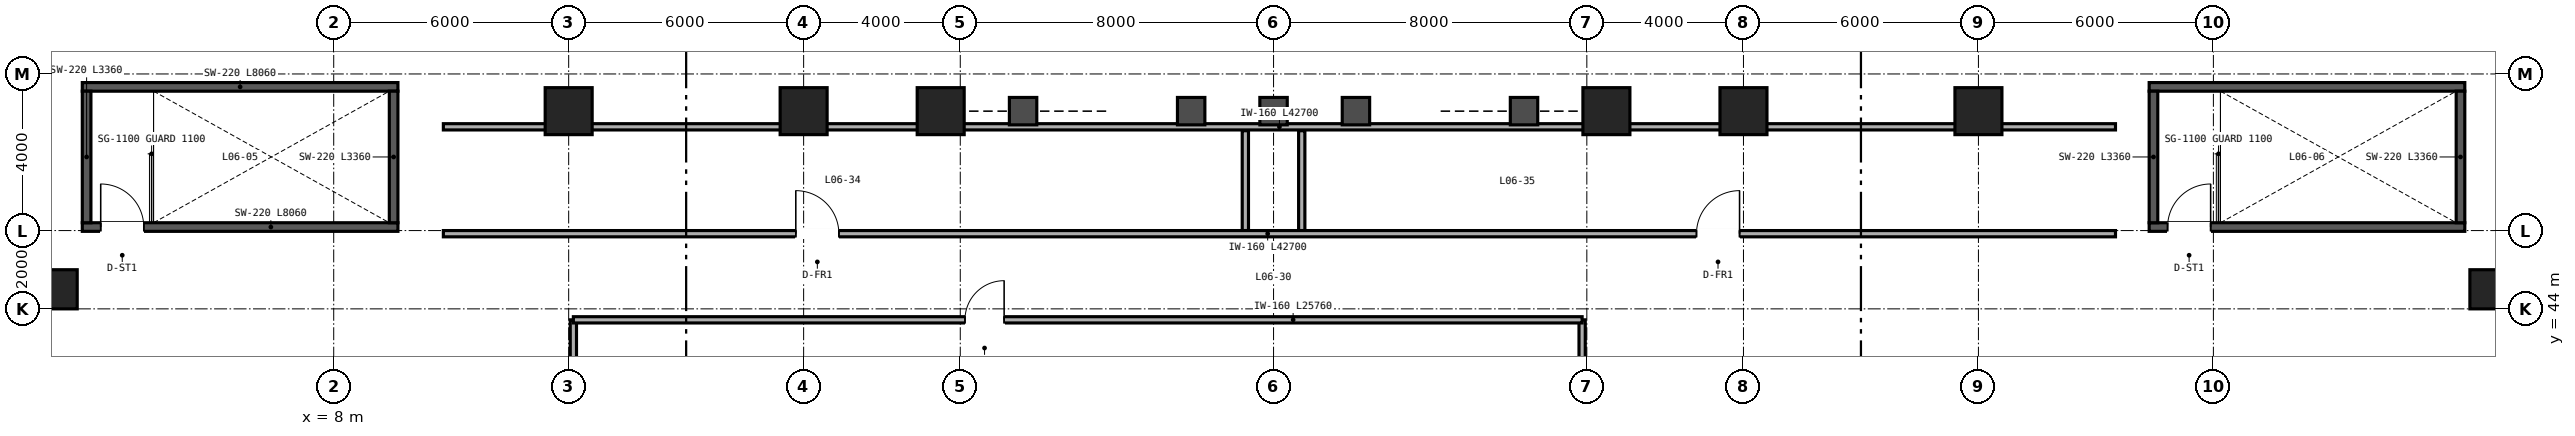
"""IFC4 building model, lengths in metres.
Left out: names, types, materials, properties, quantities, classifications, styles, units other than length and angle.
Written with IfcOpenShell. Run it as: python <this file> out.ifc"""

import sys

from ifc_helpers import new_model, si_unit, direction, frame, frame_2d, origin, origin_2d, place, context, subcontext, project, spatial, rectangle, extrude, source, transform, mapped, element, fill, save


model = new_model("IFC4")
c1 = context("Model", 3, precision=1e-05, world=origin(), true_north=direction((0.0, 1.0)))
c2 = subcontext(c1, "Body", "Model", "MODEL_VIEW")
j1 = project(units=[si_unit("LENGTHUNIT", "METRE"), si_unit("PLANEANGLEUNIT", "RADIAN")], contexts=[c1])
p1 = place(None, origin())
s1 = spatial("IfcSite", under=j1, at=p1, CompositionType="ELEMENT")
p2 = place(p1, origin())
s2 = spatial("IfcBuilding", under=s1, at=p2, CompositionType="ELEMENT")
p3 = place(p2, frame((0.0, 0.0, 28.8)))
s3 = spatial("IfcBuildingStorey", under=s2, at=p3, CompositionType="ELEMENT", Elevation=28.8)
p4 = place(p3, frame((1.58, 46.09, 0.0), z_axis=(0.0, 0.0, 1.0), x_axis=(1.0, 0.0, 0.0)))
e1 = element("IfcWall", 1, at=p4, inside=s3, PredefinedType="SHEAR", context=c2, shape_type="SweptSolid", body=[
    extrude(rectangle(XDim=8.06, YDim=0.22, at=frame_2d((4.03, 0.0))), origin(), (0.0, 0.0, 1.0), 5.8),
])
p5 = place(p4, frame((0.47, 0.0, 0.0)))
e2 = element("IfcOpeningElement", 2, at=p5, cuts=e1, PredefinedType="OPENING", context=c2, shape_type="SweptSolid", body=[
    extrude(rectangle(XDim=1.1, YDim=2.15, at=frame_2d((0.55, 1.075))), frame((0.0, 0.12, 0.0), z_axis=(0.0, -1.0, 0.0), x_axis=(1.0, 0.0, 0.0)), (0.0, 0.0, 1.0), 0.24),
])
p6 = place(p3, frame((1.58, 49.67, 0.0), z_axis=(0.0, 0.0, 1.0), x_axis=(1.0, 0.0, 0.0)))
e3 = element("IfcWall", 3, at=p6, inside=s3, PredefinedType="SHEAR", context=c2, shape_type="SweptSolid", body=[
    extrude(rectangle(XDim=8.06, YDim=0.22, at=frame_2d((4.03, 0.0))), origin(), (0.0, 0.0, 1.0), 5.8),
])
for number, where, z_axis, x_axis in (
    (4, (1.69, 46.2, 0.0), (0.0, 0.0, 1.0), (0.0, 1.0, 0.0)),
    (5, (9.53, 46.2, 0.0), (0.0, 0.0, 1.0), (0.0, 1.0, 0.0)),
):
    element("IfcWall", number, at=place(p3, frame(where, z_axis=z_axis, x_axis=x_axis)), inside=s3, PredefinedType="SHEAR", context=c2, shape_type="SweptSolid", body=[
        extrude(rectangle(XDim=3.36, YDim=0.22, at=frame_2d((1.68, 0.0))), origin(), (0.0, 0.0, 1.0), 5.8),
    ])
p7 = place(p3, frame((54.36, 46.09, 0.0), z_axis=(0.0, 0.0, 1.0), x_axis=(1.0, 0.0, 0.0)))
e6 = element("IfcWall", 6, at=p7, inside=s3, PredefinedType="SHEAR", context=c2, shape_type="SweptSolid", body=[
    extrude(rectangle(XDim=8.06, YDim=0.22, at=frame_2d((4.03, 0.0))), origin(), (0.0, 0.0, 1.0), 5.8),
])
p8 = place(p7, frame((0.47, 0.0, 0.0)))
e7 = element("IfcOpeningElement", 7, at=p8, cuts=e6, PredefinedType="OPENING", context=c2, shape_type="SweptSolid", body=[
    extrude(rectangle(XDim=1.1, YDim=2.15, at=frame_2d((0.55, 1.075))), frame((0.0, 0.12, 0.0), z_axis=(0.0, -1.0, 0.0), x_axis=(1.0, 0.0, 0.0)), (0.0, 0.0, 1.0), 0.24),
])
p9 = place(p3, frame((54.36, 49.67, 0.0), z_axis=(0.0, 0.0, 1.0), x_axis=(1.0, 0.0, 0.0)))
e8 = element("IfcWall", 8, at=p9, inside=s3, PredefinedType="SHEAR", context=c2, shape_type="SweptSolid", body=[
    extrude(rectangle(XDim=8.06, YDim=0.22, at=frame_2d((4.03, 0.0))), origin(), (0.0, 0.0, 1.0), 5.8),
])
for number, where, z_axis, x_axis in (
    (9, (54.47, 46.2, 0.0), (0.0, 0.0, 1.0), (0.0, 1.0, 0.0)),
    (10, (62.31, 46.2, 0.0), (0.0, 0.0, 1.0), (0.0, 1.0, 0.0)),
):
    element("IfcWall", number, at=place(p3, frame(where, z_axis=z_axis, x_axis=x_axis)), inside=s3, PredefinedType="SHEAR", context=c2, shape_type="SweptSolid", body=[
        extrude(rectangle(XDim=3.36, YDim=0.22, at=frame_2d((1.68, 0.0))), origin(), (0.0, 0.0, 1.0), 5.8),
    ])
m1 = source(origin(), c2, "Body", "SweptSolid", [
    extrude(rectangle(XDim=1.0, YDim=1.0, at=origin_2d()), origin(), (0.0, 0.0, 1.0), 5.75),
])
for number, where, z_axis, x_axis in (
    (11, (0.95, 44.5, 0.0), (0.0, 0.0, 1.0), (1.0, 0.0, 0.0)),
    (12, (63.05, 44.5, 0.0), (0.0, 0.0, 1.0), (1.0, 0.0, 0.0)),
):
    element("IfcColumn", number, at=place(p3, frame(where, z_axis=z_axis, x_axis=x_axis)), inside=s3, PredefinedType="COLUMN", context=c2, shape_type="MappedRepresentation", body=[
        mapped(m1, transform((0.0, 0.0, 0.0), scale=1.0)),
    ])
m2 = source(origin(), c2, "Body", "SweptSolid", [
    extrude(rectangle(XDim=1.2, YDim=1.2, at=origin_2d()), origin(), (0.0, 0.0, 1.0), 5.75),
])
for number, where, z_axis, x_axis in (
    (13, (14.0, 49.05, 0.0), (0.0, 0.0, 1.0), (1.0, 0.0, 0.0)),
    (14, (20.0, 49.05, 0.0), (0.0, 0.0, 1.0), (1.0, 0.0, 0.0)),
    (15, (23.5, 49.05, 0.0), (0.0, 0.0, 1.0), (1.0, 0.0, 0.0)),
    (16, (40.5, 49.05, 0.0), (0.0, 0.0, 1.0), (1.0, 0.0, 0.0)),
    (17, (44.0, 49.05, 0.0), (0.0, 0.0, 1.0), (1.0, 0.0, 0.0)),
    (18, (50.0, 49.05, 0.0), (0.0, 0.0, 1.0), (1.0, 0.0, 0.0)),
):
    element("IfcColumn", number, at=place(p3, frame(where, z_axis=z_axis, x_axis=x_axis)), inside=s3, PredefinedType="COLUMN", context=c2, shape_type="MappedRepresentation", body=[
        mapped(m2, transform((0.0, 0.0, 0.0), scale=1.0)),
    ])
for number, where, z_axis, x_axis in (
    (19, (14.12, 38.12, 0.0), (0.0, 0.0, 1.0), (0.0, 1.0, 0.0)),
    (20, (39.88, 38.12, 0.0), (0.0, 0.0, 1.0), (0.0, 1.0, 0.0)),
):
    element("IfcWall", number, at=place(p3, frame(where, z_axis=z_axis, x_axis=x_axis)), inside=s3, PredefinedType="PARTITIONING", context=c2, shape_type="SweptSolid", body=[
        extrude(rectangle(XDim=5.6, YDim=0.16, at=frame_2d((2.8, 0.0))), origin(), (0.0, 0.0, 1.0), 5.75),
    ])
p10 = place(p3, frame((14.12, 43.72, 0.0), z_axis=(0.0, 0.0, 1.0), x_axis=(1.0, 0.0, 0.0)))
e21 = element("IfcWall", 21, at=p10, inside=s3, PredefinedType="PARTITIONING", context=c2, shape_type="SweptSolid", body=[
    extrude(rectangle(XDim=25.76, YDim=0.16, at=frame_2d((12.88, 0.0))), origin(), (0.0, 0.0, 1.0), 4.971),
])
p11 = place(p10, frame((10.0, 0.0, 0.0)))
e22 = element("IfcOpeningElement", 22, at=p11, cuts=e21, PredefinedType="OPENING", context=c2, shape_type="SweptSolid", body=[
    extrude(rectangle(XDim=1.0, YDim=2.15, at=frame_2d((0.5, 1.075))), frame((0.0, 0.09, 0.0), z_axis=(0.0, -1.0, 0.0), x_axis=(1.0, 0.0, 0.0)), (0.0, 0.0, 1.0), 0.18),
])
p12 = place(p3, frame((10.8, 48.65, 0.0), z_axis=(0.0, 0.0, 1.0), x_axis=(1.0, 0.0, 0.0)))
e23 = element("IfcWall", 23, at=p12, inside=s3, PredefinedType="PARTITIONING", context=c2, shape_type="SweptSolid", body=[
    extrude(rectangle(XDim=42.7, YDim=0.16, at=frame_2d((21.35, 0.0))), origin(), (0.0, 0.0, 1.0), 4.971),
])
for number, where, z_axis, x_axis in (
    (24, (31.28, 46.0, 0.0), (0.0, 0.0, 1.0), (0.0, 1.0, 0.0)),
    (25, (32.72, 46.0, 0.0), (0.0, 0.0, 1.0), (0.0, 1.0, 0.0)),
):
    element("IfcWall", number, at=place(p3, frame(where, z_axis=z_axis, x_axis=x_axis)), inside=s3, PredefinedType="PARTITIONING", context=c2, shape_type="SweptSolid", body=[
        extrude(rectangle(XDim=2.55, YDim=0.16, at=frame_2d((1.275, 0.0))), origin(), (0.0, 0.0, 1.0), 5.75),
    ])
p13 = place(p3, frame((10.8, 45.92, 0.0), z_axis=(0.0, 0.0, 1.0), x_axis=(1.0, 0.0, 0.0)))
e26 = element("IfcWall", 26, at=p13, inside=s3, PredefinedType="PARTITIONING", context=c2, shape_type="SweptSolid", body=[
    extrude(rectangle(XDim=42.7, YDim=0.16, at=frame_2d((21.35, 0.0))), origin(), (0.0, 0.0, 1.0), 4.971),
])
p14 = place(p13, frame((9.0, 0.0, 0.0)))
e27 = element("IfcOpeningElement", 27, at=p14, cuts=e26, PredefinedType="OPENING", context=c2, shape_type="SweptSolid", body=[
    extrude(rectangle(XDim=1.1, YDim=2.15, at=frame_2d((0.55, 1.075))), frame((0.0, 0.09, 0.0), z_axis=(0.0, -1.0, 0.0), x_axis=(1.0, 0.0, 0.0)), (0.0, 0.0, 1.0), 0.18),
])
p15 = place(p13, frame((32.0, 0.0, 0.0)))
e28 = element("IfcOpeningElement", 28, at=p15, cuts=e26, PredefinedType="OPENING", context=c2, shape_type="SweptSolid", body=[
    extrude(rectangle(XDim=1.1, YDim=2.15, at=frame_2d((0.55, 1.075))), frame((0.0, 0.09, 0.0), z_axis=(0.0, -1.0, 0.0), x_axis=(1.0, 0.0, 0.0)), (0.0, 0.0, 1.0), 0.18),
])
m3 = source(origin(), c2, "Body", "SweptSolid", [
    extrude(rectangle(XDim=1.1, YDim=2.15, at=frame_2d((0.55, 1.075))), frame((0.0, 0.025, 0.0), z_axis=(0.0, -1.0, 0.0), x_axis=(1.0, 0.0, 0.0)), (0.0, 0.0, 1.0), 0.05),
])
p16 = place(p5, origin())
e29 = element("IfcDoor", 29, at=p16, inside=s3, OperationType="SINGLE_SWING_LEFT", PredefinedType="DOOR", context=c2, shape_type="MappedRepresentation", body=[
    mapped(m3, transform((0.0, 0.0, 0.0), scale=1.0)),
])
fill(e2, e29)
p17 = place(p8, origin())
e30 = element("IfcDoor", 30, at=p17, inside=s3, OperationType="SINGLE_SWING_RIGHT", PredefinedType="DOOR", context=c2, shape_type="MappedRepresentation", body=[
    mapped(m3, transform((0.0, 0.0, 0.0), scale=1.0)),
])
fill(e7, e30)
m4 = source(origin(), c2, "Body", "SweptSolid", [
    extrude(rectangle(XDim=1.0, YDim=2.15, at=frame_2d((0.5, 1.075))), frame((0.0, 0.025, 0.0), z_axis=(0.0, -1.0, 0.0), x_axis=(1.0, 0.0, 0.0)), (0.0, 0.0, 1.0), 0.05),
])
p18 = place(p11, origin())
e31 = element("IfcDoor", 31, at=p18, inside=s3, OperationType="SINGLE_SWING_RIGHT", PredefinedType="DOOR", context=c2, shape_type="MappedRepresentation", body=[
    mapped(m4, transform((0.0, 0.0, 0.0), scale=1.0)),
])
fill(e22, e31)
p19 = place(p14, origin())
e32 = element("IfcDoor", 32, at=p19, inside=s3, OperationType="SINGLE_SWING_LEFT", PredefinedType="DOOR", context=c2, shape_type="MappedRepresentation", body=[
    mapped(m3, transform((0.0, 0.0, 0.0), scale=1.0)),
])
fill(e27, e32)
p20 = place(p15, origin())
e33 = element("IfcDoor", 33, at=p20, inside=s3, OperationType="SINGLE_SWING_RIGHT", PredefinedType="DOOR", context=c2, shape_type="MappedRepresentation", body=[
    mapped(m3, transform((0.0, 0.0, 0.0), scale=1.0)),
])
fill(e28, e33)
save(model, sys.argv[1])
